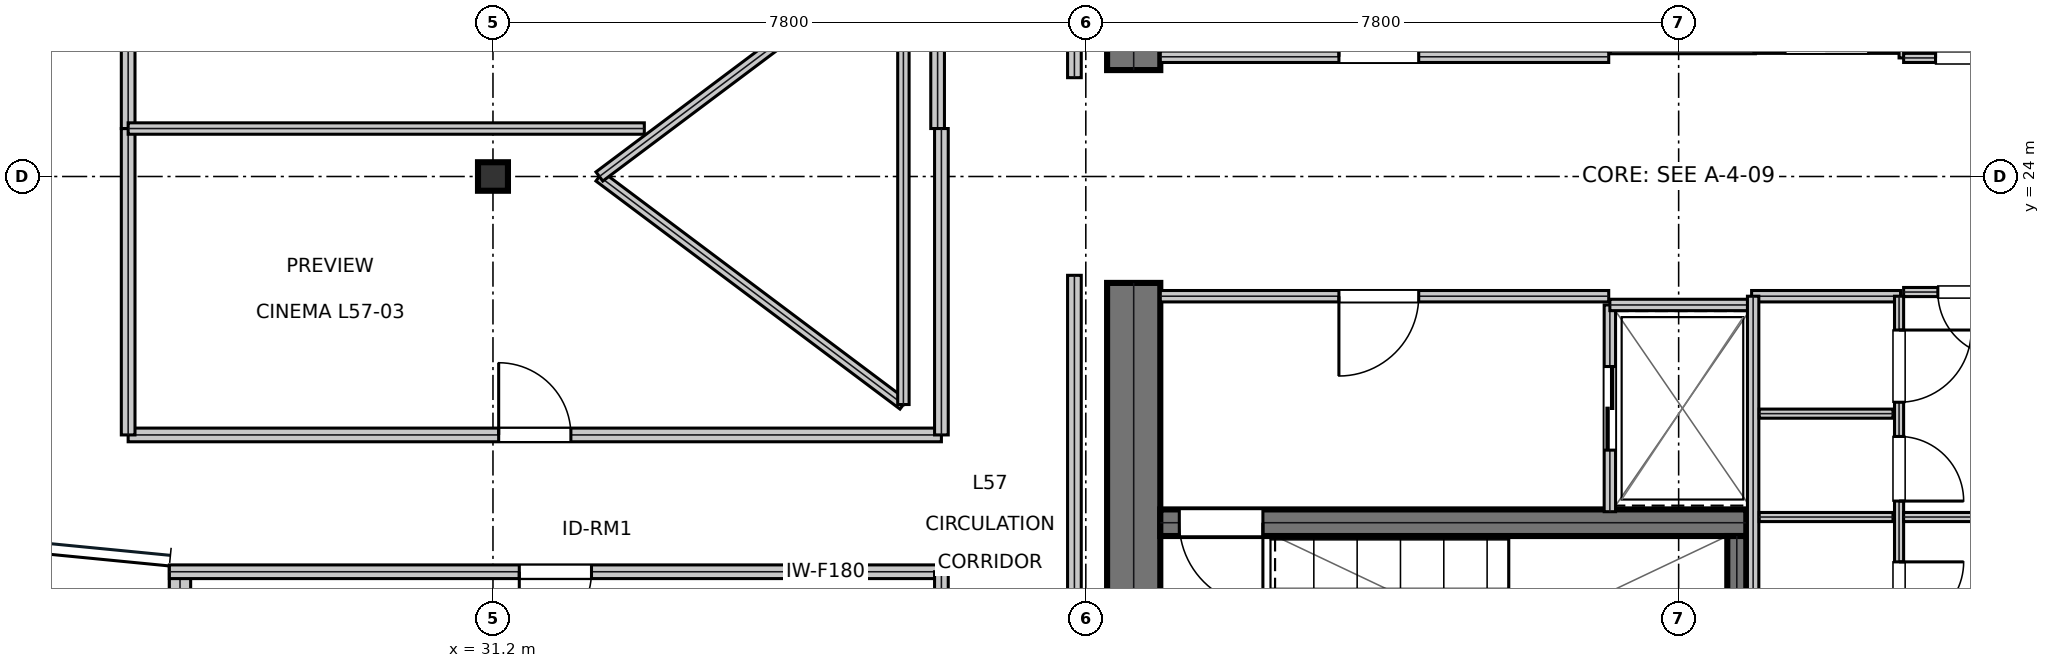
"""IFC4 building model, lengths in metres.
Left out: names, types, materials, properties, quantities, classifications, styles, units other than length and angle.
Written with IfcOpenShell. Run it as: python <this file> out.ifc"""

import sys

from ifc_helpers import new_model, si_unit, direction, frame, frame_2d, origin, origin_2d, place, context, subcontext, project, spatial, rectangle, i_section, extrude, element, fill, save


model = new_model("IFC4")
c1 = context("Model", 3, precision=1e-05, world=origin(), true_north=direction((0.0, 1.0)))
c2 = subcontext(c1, "Body", "Model", "MODEL_VIEW")
j1 = project(units=[si_unit("LENGTHUNIT", "METRE"), si_unit("PLANEANGLEUNIT", "RADIAN")], contexts=[c1])
p1 = place(None, origin())
s1 = spatial("IfcSite", under=j1, at=p1, CompositionType="ELEMENT")
p2 = place(p1, origin())
s2 = spatial("IfcBuilding", under=s1, at=p2, CompositionType="ELEMENT")
p3 = place(p2, frame((0.0, 0.0, 244.5)))
s3 = spatial("IfcBuildingStorey", under=s2, at=p3, CompositionType="ELEMENT", Elevation=244.5)
for number, where, z_axis, x_axis in (
    (1, (39.63, 16.45, 0.0), (0.0, 0.0, 1.0), (0.0, 1.0, 0.0)),
    (2, (39.63, 25.4, 0.0), (0.0, 0.0, 1.0), (0.0, 1.0, 0.0)),
):
    element("IfcWall", number, at=place(p3, frame(where, z_axis=z_axis, x_axis=x_axis)), inside=s3, PredefinedType="SHEAR", context=c2, shape_type="SweptSolid", body=[
        extrude(rectangle(XDim=6.15, YDim=0.7, at=frame_2d((3.075, 0.0))), origin(), (0.0, 0.0, 1.0), 3.79),
    ])
p4 = place(p3, frame((39.98, 19.445, 0.0), z_axis=(0.0, 0.0, 1.0), x_axis=(1.0, 0.0, 0.0)))
e3 = element("IfcWall", 3, at=p4, inside=s3, PredefinedType="SHEAR", context=c2, shape_type="SweptSolid", body=[
    extrude(rectangle(XDim=7.71, YDim=0.35, at=frame_2d((3.855, 0.0))), origin(), (0.0, 0.0, 1.0), 3.79),
])
p5 = place(p4, frame((0.25, 0.0, 0.0)))
e4 = element("IfcOpeningElement", 4, at=p5, cuts=e3, PredefinedType="OPENING", context=c2, shape_type="SweptSolid", body=[
    extrude(rectangle(XDim=1.1, YDim=2.15, at=frame_2d((0.55, 1.075))), frame((0.0, 0.185, 0.0), z_axis=(0.0, -1.0, 0.0), x_axis=(1.0, 0.0, 0.0)), (0.0, 0.0, 1.0), 0.37),
])
p6 = place(p3, frame((47.565, 16.45, 0.0), z_axis=(0.0, 0.0, 1.0), x_axis=(0.0, 1.0, 0.0)))
e5 = element("IfcWall", 5, at=p6, inside=s3, PredefinedType="SHEAR", context=c2, shape_type="SweptSolid", body=[
    extrude(rectangle(XDim=2.82, YDim=0.25, at=frame_2d((1.41, 0.0))), origin(), (0.0, 0.0, 1.0), 3.79),
])
p7 = place(p3, frame((31.2, 24.0, 0.0), z_axis=(0.0, 0.0, 1.0), x_axis=(1.0, 0.0, 0.0)))
e6 = element("IfcColumn", 6, at=p7, inside=s3, PredefinedType="COLUMN", context=c2, shape_type="SweptSolid", body=[
    extrude(i_section(OverallWidth=0.394, OverallDepth=0.375, WebThickness=0.017, FlangeThickness=0.028, at=origin_2d()), origin(), (0.0, 0.0, 1.0), 4.044),
])
p8 = place(p3, frame((27.083, 18.876, 0.0), z_axis=(0.0, 0.0, 1.0), x_axis=(0.0, -1.0, 0.0)))
e7 = element("IfcWall", 7, at=p8, inside=s3, PredefinedType="STANDARD", context=c2, shape_type="SweptSolid", body=[
    extrude(rectangle(XDim=2.876, YDim=0.28, at=frame_2d((1.438, 0.0))), origin(), (0.0, 0.0, 1.0), 3.319),
])
p9 = place(p3, frame((39.98, 25.575, 0.0), z_axis=(0.0, 0.0, 1.0), x_axis=(1.0, 0.0, 0.0)))
e8 = element("IfcWall", 8, at=p9, inside=s3, PredefinedType="PARTITIONING", context=c2, shape_type="SweptSolid", body=[
    extrude(rectangle(XDim=5.9, YDim=0.15, at=frame_2d((2.95, 0.0))), origin(), (0.0, 0.0, 1.0), 3.79),
])
p10 = place(p9, frame((2.35, 0.0, 0.0)))
e9 = element("IfcOpeningElement", 9, at=p10, cuts=e8, PredefinedType="OPENING", context=c2, shape_type="SweptSolid", body=[
    extrude(rectangle(XDim=1.05, YDim=2.15, at=frame_2d((0.525, 1.075))), frame((0.0, 0.085, 0.0), z_axis=(0.0, -1.0, 0.0), x_axis=(1.0, 0.0, 0.0)), (0.0, 0.0, 1.0), 0.17),
])
p11 = place(p3, frame((39.98, 22.425, 0.0), z_axis=(0.0, 0.0, 1.0), x_axis=(1.0, 0.0, 0.0)))
e10 = element("IfcWall", 10, at=p11, inside=s3, PredefinedType="PARTITIONING", context=c2, shape_type="SweptSolid", body=[
    extrude(rectangle(XDim=5.9, YDim=0.15, at=frame_2d((2.95, 0.0))), origin(), (0.0, 0.0, 1.0), 3.79),
])
p12 = place(p11, frame((2.35, 0.0, 0.0)))
e11 = element("IfcOpeningElement", 11, at=p12, cuts=e10, PredefinedType="OPENING", context=c2, shape_type="SweptSolid", body=[
    extrude(rectangle(XDim=1.05, YDim=2.15, at=frame_2d((0.525, 1.075))), frame((0.0, 0.085, 0.0), z_axis=(0.0, -1.0, 0.0), x_axis=(1.0, 0.0, 0.0)), (0.0, 0.0, 1.0), 0.17),
])
p13 = place(p3, frame((45.895, 25.69, 0.0), z_axis=(0.0, 0.0, 1.0), x_axis=(1.0, 0.0, 0.0)))
e12 = element("IfcWall", 12, at=p13, inside=s3, PredefinedType="PARTITIONING", context=c2, shape_type="SweptSolid", body=[
    extrude(rectangle(XDim=1.915, YDim=0.15, at=frame_2d((0.958, 0.0))), origin(), (0.0, 0.0, 1.0), 3.79),
])
p14 = place(p3, frame((45.895, 19.59, 0.0), z_axis=(0.0, 0.0, 1.0), x_axis=(0.0, 1.0, 0.0)))
e13 = element("IfcWall", 13, at=p14, inside=s3, PredefinedType="PARTITIONING", context=c2, shape_type="SweptSolid", body=[
    extrude(rectangle(XDim=2.72, YDim=0.15, at=frame_2d((1.36, 0.0))), origin(), (0.0, 0.0, 1.0), 3.79),
])
p15 = place(p14, frame((0.81, 0.0, 0.0)))
e14 = element("IfcOpeningElement", 14, at=p15, cuts=e13, PredefinedType="OPENING", context=c2, shape_type="SweptSolid", body=[
    extrude(rectangle(XDim=1.1, YDim=2.15, at=frame_2d((0.55, 1.075))), frame((0.0, 0.085, 0.0), z_axis=(0.0, -1.0, 0.0), x_axis=(1.0, 0.0, 0.0)), (0.0, 0.0, 1.0), 0.17),
])
p16 = place(p3, frame((45.895, 22.31, 0.0), z_axis=(0.0, 0.0, 1.0), x_axis=(1.0, 0.0, 0.0)))
e15 = element("IfcWall", 15, at=p16, inside=s3, PredefinedType="PARTITIONING", context=c2, shape_type="SweptSolid", body=[
    extrude(rectangle(XDim=1.915, YDim=0.15, at=frame_2d((0.958, 0.0))), origin(), (0.0, 0.0, 1.0), 3.79),
])
p17 = place(p3, frame((47.79, 25.695, 0.0), z_axis=(0.0, 0.0, 1.0), x_axis=(1.0, 0.0, 0.0)))
e16 = element("IfcWall", 16, at=p17, inside=s3, PredefinedType="PARTITIONING", context=c2, shape_type="SweptSolid", body=[
    extrude(rectangle(XDim=1.92, YDim=0.15, at=frame_2d((0.96, 0.0))), origin(), (0.0, 0.0, 1.0), 3.79),
])
p18 = place(p17, frame((0.41, 0.0, 0.0)))
e17 = element("IfcOpeningElement", 17, at=p18, cuts=e16, PredefinedType="OPENING", context=c2, shape_type="SweptSolid", body=[
    extrude(rectangle(XDim=1.1, YDim=2.15, at=frame_2d((0.55, 1.075))), frame((0.0, 0.085, 0.0), z_axis=(0.0, -1.0, 0.0), x_axis=(1.0, 0.0, 0.0)), (0.0, 0.0, 1.0), 0.17),
])
p19 = place(p3, frame((47.76, 22.425, 0.0), z_axis=(0.0, 0.0, 1.0), x_axis=(1.0, 0.0, 0.0)))
e18 = element("IfcWall", 18, at=p19, inside=s3, PredefinedType="PARTITIONING", context=c2, shape_type="SweptSolid", body=[
    extrude(rectangle(XDim=1.96, YDim=0.15, at=frame_2d((0.98, 0.0))), origin(), (0.0, 0.0, 1.0), 3.79),
])
p20 = place(p3, frame((47.78, 16.45, 0.0), z_axis=(0.0, 0.0, 1.0), x_axis=(0.0, 1.0, 0.0)))
e19 = element("IfcWall", 19, at=p20, inside=s3, PredefinedType="PARTITIONING", context=c2, shape_type="SweptSolid", body=[
    extrude(rectangle(XDim=5.975, YDim=0.15, at=frame_2d((2.988, 0.0))), origin(), (0.0, 0.0, 1.0), 3.79),
])
for number, where, z_axis, x_axis in (
    (20, (47.86, 19.52, 0.0), (0.0, 0.0, 1.0), (1.0, 0.0, 0.0)),
    (21, (47.86, 20.88, 0.0), (0.0, 0.0, 1.0), (1.0, 0.0, 0.0)),
):
    element("IfcWall", number, at=place(p3, frame(where, z_axis=z_axis, x_axis=x_axis)), inside=s3, PredefinedType="PARTITIONING", context=c2, shape_type="SweptSolid", body=[
        extrude(rectangle(XDim=1.76, YDim=0.12, at=frame_2d((0.88, 0.0))), origin(), (0.0, 0.0, 1.0), 3.79),
    ])
p21 = place(p3, frame((49.7, 16.48, 0.0), z_axis=(0.0, 0.0, 1.0), x_axis=(0.0, 1.0, 0.0)))
e22 = element("IfcWall", 22, at=p21, inside=s3, PredefinedType="PARTITIONING", context=c2, shape_type="SweptSolid", body=[
    extrude(rectangle(XDim=5.945, YDim=0.12, at=frame_2d((2.973, 0.0))), origin(), (0.0, 0.0, 1.0), 3.79),
])
p22 = place(p21, frame((1.6, 0.0, 0.0)))
e23 = element("IfcOpeningElement", 23, at=p22, cuts=e22, PredefinedType="OPENING", context=c2, shape_type="SweptSolid", body=[
    extrude(rectangle(XDim=0.85, YDim=2.15, at=frame_2d((0.425, 1.075))), frame((0.0, 0.07, 0.0), z_axis=(0.0, -1.0, 0.0), x_axis=(1.0, 0.0, 0.0)), (0.0, 0.0, 1.0), 0.14),
])
p23 = place(p21, frame((3.25, 0.0, 0.0)))
e24 = element("IfcOpeningElement", 24, at=p23, cuts=e22, PredefinedType="OPENING", context=c2, shape_type="SweptSolid", body=[
    extrude(rectangle(XDim=0.85, YDim=2.15, at=frame_2d((0.425, 1.075))), frame((0.0, 0.07, 0.0), z_axis=(0.0, -1.0, 0.0), x_axis=(1.0, 0.0, 0.0)), (0.0, 0.0, 1.0), 0.14),
])
p24 = place(p21, frame((4.55, 0.0, 0.0)))
e25 = element("IfcOpeningElement", 25, at=p24, cuts=e22, PredefinedType="OPENING", context=c2, shape_type="SweptSolid", body=[
    extrude(rectangle(XDim=0.95, YDim=2.15, at=frame_2d((0.475, 1.075))), frame((0.0, 0.07, 0.0), z_axis=(0.0, -1.0, 0.0), x_axis=(1.0, 0.0, 0.0)), (0.0, 0.0, 1.0), 0.14),
])
p25 = place(p3, frame((49.76, 22.48, 0.0), z_axis=(0.0, 0.0, 1.0), x_axis=(1.0, 0.0, 0.0)))
e26 = element("IfcWall", 26, at=p25, inside=s3, PredefinedType="PARTITIONING", context=c2, shape_type="SweptSolid", body=[
    extrude(rectangle(XDim=3.9, YDim=0.12, at=frame_2d((1.95, 0.0))), origin(), (0.0, 0.0, 1.0), 3.79),
])
p26 = place(p25, frame((0.45, 0.0, 0.0)))
e27 = element("IfcOpeningElement", 27, at=p26, cuts=e26, PredefinedType="OPENING", context=c2, shape_type="SweptSolid", body=[
    extrude(rectangle(XDim=0.85, YDim=2.15, at=frame_2d((0.425, 1.075))), frame((0.0, 0.07, 0.0), z_axis=(0.0, -1.0, 0.0), x_axis=(1.0, 0.0, 0.0)), (0.0, 0.0, 1.0), 0.14),
])
p27 = place(p3, frame((49.76, 19.52, 0.0), z_axis=(0.0, 0.0, 1.0), x_axis=(1.0, 0.0, 0.0)))
e28 = element("IfcWall", 28, at=p27, inside=s3, PredefinedType="PARTITIONING", context=c2, shape_type="SweptSolid", body=[
    extrude(rectangle(XDim=1.64, YDim=0.12, at=frame_2d((0.82, 0.0))), origin(), (0.0, 0.0, 1.0), 3.79),
])
p28 = place(p3, frame((49.76, 25.56, 0.0), z_axis=(0.0, 0.0, 1.0), x_axis=(0.0, 1.0, 0.0)))
e29 = element("IfcWall", 29, at=p28, inside=s3, PredefinedType="PARTITIONING", context=c2, shape_type="SweptSolid", body=[
    extrude(rectangle(XDim=2.66, YDim=0.12, at=frame_2d((1.33, 0.0))), origin(), (0.0, 0.0, 1.0), 3.79),
])
p29 = place(p3, frame((49.76, 25.56, 0.0), z_axis=(0.0, 0.0, 1.0), x_axis=(1.0, 0.0, 0.0)))
e30 = element("IfcWall", 30, at=p29, inside=s3, PredefinedType="PARTITIONING", context=c2, shape_type="SweptSolid", body=[
    extrude(rectangle(XDim=1.66, YDim=0.12, at=frame_2d((0.83, 0.0))), origin(), (0.0, 0.0, 1.0), 3.79),
])
p30 = place(p29, frame((0.42, 0.0, 0.0)))
e31 = element("IfcOpeningElement", 31, at=p30, cuts=e30, PredefinedType="OPENING", context=c2, shape_type="SweptSolid", body=[
    extrude(rectangle(XDim=0.85, YDim=2.15, at=frame_2d((0.425, 1.075))), frame((0.0, 0.07, 0.0), z_axis=(0.0, -1.0, 0.0), x_axis=(1.0, 0.0, 0.0)), (0.0, 0.0, 1.0), 0.14),
])
p31 = place(p3, frame((26.942, 18.8, 0.0), z_axis=(0.0, 0.0, 1.0), x_axis=(1.0, 0.0, 0.0)))
e32 = element("IfcWall", 32, at=p31, inside=s3, PredefinedType="SOLIDWALL", context=c2, shape_type="SweptSolid", body=[
    extrude(rectangle(XDim=10.158, YDim=0.18, at=frame_2d((5.079, 0.0))), origin(), (0.0, 0.0, 1.0), 3.241),
])
p32 = place(p31, frame((4.604, 0.0, 0.0)))
e33 = element("IfcOpeningElement", 33, at=p32, cuts=e32, PredefinedType="OPENING", context=c2, shape_type="SweptSolid", body=[
    extrude(rectangle(XDim=0.95, YDim=2.15, at=frame_2d((0.475, 1.075))), frame((0.0, 0.1, 0.0), z_axis=(0.0, -1.0, 0.0), x_axis=(1.0, 0.0, 0.0)), (0.0, 0.0, 1.0), 0.2),
])
p33 = place(p3, frame((26.4, 20.6, 0.0), z_axis=(0.0, 0.0, 1.0), x_axis=(1.0, 0.0, 0.0)))
e34 = element("IfcWall", 34, at=p33, inside=s3, PredefinedType="SOLIDWALL", context=c2, shape_type="SweptSolid", body=[
    extrude(rectangle(XDim=10.7, YDim=0.18, at=frame_2d((5.35, 0.0))), origin(), (0.0, 0.0, 1.0), 3.241),
])
p34 = place(p33, frame((4.875, 0.0, 0.0)))
e35 = element("IfcOpeningElement", 35, at=p34, cuts=e34, PredefinedType="OPENING", context=c2, shape_type="SweptSolid", body=[
    extrude(rectangle(XDim=0.95, YDim=2.15, at=frame_2d((0.475, 1.075))), frame((0.0, 0.1, 0.0), z_axis=(0.0, -1.0, 0.0), x_axis=(1.0, 0.0, 0.0)), (0.0, 0.0, 1.0), 0.2),
])
p35 = place(p3, frame((37.05, 24.631, 0.0), z_axis=(0.0, 0.0, 1.0), x_axis=(0.0, 1.0, 0.0)))
e36 = element("IfcWall", 36, at=p35, inside=s3, PredefinedType="SOLIDWALL", context=c2, shape_type="SweptSolid", body=[
    extrude(rectangle(XDim=8.869, YDim=0.18, at=frame_2d((4.435, 0.0))), origin(), (0.0, 0.0, 1.0), 3.241),
])
p36 = place(p35, frame((3.959, 0.0, 0.0)))
e37 = element("IfcOpeningElement", 37, at=p36, cuts=e36, PredefinedType="OPENING", context=c2, shape_type="SweptSolid", body=[
    extrude(rectangle(XDim=0.95, YDim=2.15, at=frame_2d((0.475, 1.075))), frame((0.0, 0.1, 0.0), z_axis=(0.0, -1.0, 0.0), x_axis=(1.0, 0.0, 0.0)), (0.0, 0.0, 1.0), 0.2),
])
p37 = place(p3, frame((38.85, 14.5, 0.0), z_axis=(0.0, 0.0, 1.0), x_axis=(0.0, 1.0, 0.0)))
e38 = element("IfcWall", 38, at=p37, inside=s3, PredefinedType="SOLIDWALL", context=c2, shape_type="SweptSolid", body=[
    extrude(rectangle(XDim=8.2, YDim=0.18, at=frame_2d((4.1, 0.0))), origin(), (0.0, 0.0, 1.0), 3.241),
])
p38 = place(p3, frame((37.1, 14.5, 0.0), z_axis=(0.0, 0.0, 1.0), x_axis=(0.0, 1.0, 0.0)))
e39 = element("IfcWall", 39, at=p38, inside=s3, PredefinedType="SOLIDWALL", context=c2, shape_type="SweptSolid", body=[
    extrude(rectangle(XDim=4.3, YDim=0.18, at=frame_2d((2.15, 0.0))), origin(), (0.0, 0.0, 1.0), 3.241),
])
p39 = place(p3, frame((26.4, 20.6, 0.0), z_axis=(0.0, 0.0, 1.0), x_axis=(0.0, 1.0, 0.0)))
e40 = element("IfcWall", 40, at=p39, inside=s3, PredefinedType="SOLIDWALL", context=c2, shape_type="SweptSolid", body=[
    extrude(rectangle(XDim=4.031, YDim=0.18, at=frame_2d((2.016, 0.0))), origin(), (0.0, 0.0, 1.0), 3.241),
])
p40 = place(p3, frame((37.1, 20.6, 0.0), z_axis=(0.0, 0.0, 1.0), x_axis=(0.0, 1.0, 0.0)))
e41 = element("IfcWall", 41, at=p40, inside=s3, PredefinedType="SOLIDWALL", context=c2, shape_type="SweptSolid", body=[
    extrude(rectangle(XDim=4.031, YDim=0.18, at=frame_2d((2.016, 0.0))), origin(), (0.0, 0.0, 1.0), 3.79),
])
p41 = place(p3, frame((38.85, 25.3, 0.0), z_axis=(0.0, 0.0, 1.0), x_axis=(0.0, 1.0, 0.0)))
e42 = element("IfcWall", 42, at=p41, inside=s3, PredefinedType="SOLIDWALL", context=c2, shape_type="SweptSolid", body=[
    extrude(rectangle(XDim=8.2, YDim=0.18, at=frame_2d((4.1, 0.0))), origin(), (0.0, 0.0, 1.0), 3.241),
])
p42 = place(p3, frame((26.4, 24.631, 0.0), z_axis=(0.0, 0.0, 1.0), x_axis=(0.0, 1.0, 0.0)))
e43 = element("IfcWall", 43, at=p42, inside=s3, PredefinedType="SOLIDWALL", context=c2, shape_type="SweptSolid", body=[
    extrude(rectangle(XDim=4.44, YDim=0.18, at=frame_2d((2.22, 0.0))), origin(), (0.0, 0.0, 1.0), 3.241),
])
p43 = place(p3, frame((26.4, 24.631, 0.0), z_axis=(0.0, 0.0, 1.0), x_axis=(1.0, 0.0, 0.0)))
e44 = element("IfcWall", 44, at=p43, inside=s3, PredefinedType="MOVABLE", context=c2, shape_type="SweptSolid", body=[
    extrude(rectangle(XDim=6.792, YDim=0.15, at=frame_2d((3.396, 0.0))), origin(), (0.0, 0.0, 1.0), 3.241),
])
p44 = place(p3, frame((32.6, 24.0, 0.0), z_axis=(0.0, 0.0, 1.0), x_axis=(0.8, -0.6, 0.0)))
e45 = element("IfcWall", 45, at=p44, inside=s3, PredefinedType="MOVABLE", context=c2, shape_type="SweptSolid", body=[
    extrude(rectangle(XDim=5.0, YDim=0.15, at=frame_2d((2.5, 0.0))), origin(), (0.0, 0.0, 1.0), 3.79),
])
p45 = place(p3, frame((36.6, 21.0, 0.0), z_axis=(0.0, 0.0, 1.0), x_axis=(0.0, 1.0, 0.0)))
e46 = element("IfcWall", 46, at=p45, inside=s3, PredefinedType="MOVABLE", context=c2, shape_type="SweptSolid", body=[
    extrude(rectangle(XDim=6.0, YDim=0.15, at=frame_2d((3.0, 0.0))), origin(), (0.0, 0.0, 1.0), 3.79),
])
p46 = place(p3, frame((36.6, 27.0, 0.0), z_axis=(0.0, 0.0, 1.0), x_axis=(-0.8, -0.6, 0.0)))
e47 = element("IfcWall", 47, at=p46, inside=s3, PredefinedType="MOVABLE", context=c2, shape_type="SweptSolid", body=[
    extrude(rectangle(XDim=5.0, YDim=0.15, at=frame_2d((2.5, 0.0))), origin(), (0.0, 0.0, 1.0), 3.79),
])
p47 = place(p10, origin())
e48 = element("IfcDoor", 48, at=p47, inside=s3, OperationType="SINGLE_SWING_LEFT", PredefinedType="DOOR", context=c2, shape_type="SweptSolid", body=[
    extrude(rectangle(XDim=1.05, YDim=2.15, at=frame_2d((0.525, 1.075))), frame((0.0, 0.025, 0.0), z_axis=(0.0, -1.0, 0.0), x_axis=(1.0, 0.0, 0.0)), (0.0, 0.0, 1.0), 0.05),
])
fill(e9, e48)
p48 = place(p12, frame((1.05, 0.0, 0.0), z_axis=(0.0, 0.0, 1.0), x_axis=(-1.0, 0.0, 0.0)))
e49 = element("IfcDoor", 49, at=p48, inside=s3, OperationType="SINGLE_SWING_RIGHT", PredefinedType="DOOR", context=c2, shape_type="SweptSolid", body=[
    extrude(rectangle(XDim=1.05, YDim=2.15, at=frame_2d((0.525, 1.075))), frame((0.0, 0.025, 0.0), z_axis=(0.0, -1.0, 0.0), x_axis=(1.0, 0.0, 0.0)), (0.0, 0.0, 1.0), 0.05),
])
fill(e11, e49)
p49 = place(p15, frame((1.1, 0.0, 0.0), z_axis=(0.0, 0.0, 1.0), x_axis=(-1.0, 0.0, 0.0)))
e50 = element("IfcDoor", 50, at=p49, inside=s3, OperationType="DOUBLE_DOOR_SLIDING", PredefinedType="DOOR", context=c2, shape_type="SweptSolid", body=[
    extrude(rectangle(XDim=1.1, YDim=2.15, at=frame_2d((0.55, 1.075))), frame((0.0, 0.025, 0.0), z_axis=(0.0, -1.0, 0.0), x_axis=(1.0, 0.0, 0.0)), (0.0, 0.0, 1.0), 0.05),
])
fill(e14, e50)
p50 = place(p22, frame((0.85, 0.0, 0.0), z_axis=(0.0, 0.0, 1.0), x_axis=(-1.0, 0.0, 0.0)))
e51 = element("IfcDoor", 51, at=p50, inside=s3, OperationType="SINGLE_SWING_LEFT", PredefinedType="DOOR", context=c2, shape_type="SweptSolid", body=[
    extrude(rectangle(XDim=0.85, YDim=2.15, at=frame_2d((0.425, 1.075))), frame((0.0, 0.025, 0.0), z_axis=(0.0, -1.0, 0.0), x_axis=(1.0, 0.0, 0.0)), (0.0, 0.0, 1.0), 0.05),
])
fill(e23, e51)
p51 = place(p23, frame((0.85, 0.0, 0.0), z_axis=(0.0, 0.0, 1.0), x_axis=(-1.0, 0.0, 0.0)))
e52 = element("IfcDoor", 52, at=p51, inside=s3, OperationType="SINGLE_SWING_RIGHT", PredefinedType="DOOR", context=c2, shape_type="SweptSolid", body=[
    extrude(rectangle(XDim=0.85, YDim=2.15, at=frame_2d((0.425, 1.075))), frame((0.0, 0.025, 0.0), z_axis=(0.0, -1.0, 0.0), x_axis=(1.0, 0.0, 0.0)), (0.0, 0.0, 1.0), 0.05),
])
fill(e24, e52)
p52 = place(p24, frame((0.95, 0.0, 0.0), z_axis=(0.0, 0.0, 1.0), x_axis=(-1.0, 0.0, 0.0)))
e53 = element("IfcDoor", 53, at=p52, inside=s3, OperationType="SINGLE_SWING_LEFT", PredefinedType="DOOR", context=c2, shape_type="SweptSolid", body=[
    extrude(rectangle(XDim=0.95, YDim=2.15, at=frame_2d((0.475, 1.075))), frame((0.0, 0.025, 0.0), z_axis=(0.0, -1.0, 0.0), x_axis=(1.0, 0.0, 0.0)), (0.0, 0.0, 1.0), 0.05),
])
fill(e25, e53)
p53 = place(p26, frame((0.85, 0.0, 0.0), z_axis=(0.0, 0.0, 1.0), x_axis=(-1.0, 0.0, 0.0)))
e54 = element("IfcDoor", 54, at=p53, inside=s3, OperationType="SINGLE_SWING_LEFT", PredefinedType="DOOR", context=c2, shape_type="SweptSolid", body=[
    extrude(rectangle(XDim=0.85, YDim=2.15, at=frame_2d((0.425, 1.075))), frame((0.0, 0.025, 0.0), z_axis=(0.0, -1.0, 0.0), x_axis=(1.0, 0.0, 0.0)), (0.0, 0.0, 1.0), 0.05),
])
fill(e27, e54)
p54 = place(p30, origin())
e55 = element("IfcDoor", 55, at=p54, inside=s3, OperationType="SINGLE_SWING_LEFT", PredefinedType="DOOR", context=c2, shape_type="SweptSolid", body=[
    extrude(rectangle(XDim=0.85, YDim=2.15, at=frame_2d((0.425, 1.075))), frame((0.0, 0.025, 0.0), z_axis=(0.0, -1.0, 0.0), x_axis=(1.0, 0.0, 0.0)), (0.0, 0.0, 1.0), 0.05),
])
fill(e31, e55)
p55 = place(p32, frame((0.95, 0.0, 0.0), z_axis=(0.0, 0.0, 1.0), x_axis=(-1.0, 0.0, 0.0)))
e56 = element("IfcDoor", 56, at=p55, inside=s3, OperationType="SINGLE_SWING_RIGHT", PredefinedType="DOOR", context=c2, shape_type="SweptSolid", body=[
    extrude(rectangle(XDim=0.95, YDim=2.15, at=frame_2d((0.475, 1.075))), frame((0.0, 0.025, 0.0), z_axis=(0.0, -1.0, 0.0), x_axis=(1.0, 0.0, 0.0)), (0.0, 0.0, 1.0), 0.05),
])
fill(e33, e56)
p56 = place(p34, origin())
e57 = element("IfcDoor", 57, at=p56, inside=s3, OperationType="SINGLE_SWING_LEFT", PredefinedType="DOOR", context=c2, shape_type="SweptSolid", body=[
    extrude(rectangle(XDim=0.95, YDim=2.15, at=frame_2d((0.475, 1.075))), frame((0.0, 0.025, 0.0), z_axis=(0.0, -1.0, 0.0), x_axis=(1.0, 0.0, 0.0)), (0.0, 0.0, 1.0), 0.05),
])
fill(e35, e57)
p57 = place(p5, frame((1.1, 0.0, 0.0), z_axis=(0.0, 0.0, 1.0), x_axis=(-1.0, 0.0, 0.0)))
e58 = element("IfcDoor", 58, at=p57, inside=s3, OperationType="SINGLE_SWING_LEFT", PredefinedType="DOOR", context=c2, shape_type="SweptSolid", body=[
    extrude(rectangle(XDim=1.1, YDim=2.15, at=frame_2d((0.55, 1.075))), frame((0.0, 0.025, 0.0), z_axis=(0.0, -1.0, 0.0), x_axis=(1.0, 0.0, 0.0)), (0.0, 0.0, 1.0), 0.05),
])
fill(e4, e58)
save(model, sys.argv[1])
